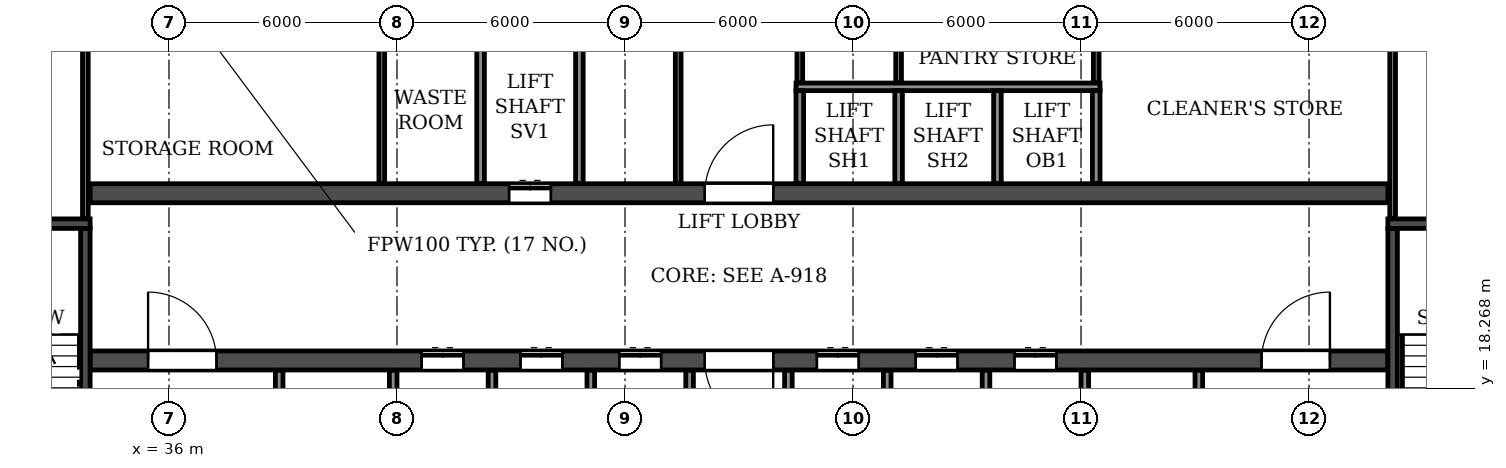
"""IFC4 building model, lengths in metres.
Left out: names, types, materials, properties, quantities, classifications, styles, units other than length and angle.
Written with IfcOpenShell. Run it as: python <this file> out.ifc"""

import sys

from ifc_helpers import new_model, si_unit, direction, frame, frame_2d, origin, place, context, subcontext, project, spatial, rectangle, extrude, element, fill, save


model = new_model("IFC4")
c1 = context("Model", 3, precision=1e-05, world=origin(), true_north=direction((0.0, 1.0)))
c2 = subcontext(c1, "Body", "Model", "MODEL_VIEW")
j1 = project(units=[si_unit("LENGTHUNIT", "METRE"), si_unit("PLANEANGLEUNIT", "RADIAN")], contexts=[c1])
p1 = place(None, origin())
s1 = spatial("IfcSite", under=j1, at=p1, CompositionType="ELEMENT")
p2 = place(p1, origin())
s2 = spatial("IfcBuilding", under=s1, at=p2, CompositionType="ELEMENT")
p3 = place(p2, frame((0.0, 0.0, 102.6)))
s3 = spatial("IfcBuildingStorey", under=s2, at=p3, CompositionType="ELEMENT", Elevation=102.6)
p4 = place(p3, frame((33.925, 19.0, 0.0), z_axis=(0.0, 0.0, 1.0), x_axis=(1.0, 0.0, 0.0)))
e1 = element("IfcWall", 1, at=p4, inside=s3, PredefinedType="SOLIDWALL", context=c2, shape_type="SweptSolid", body=[
    extrude(rectangle(XDim=34.15, YDim=0.5, at=frame_2d((17.075, 0.0))), origin(), (0.0, 0.0, 1.0), 3.0),
])
p5 = place(p4, frame((16.175, 0.0, 0.0)))
e2 = element("IfcOpeningElement", 2, at=p5, cuts=e1, PredefinedType="OPENING", context=c2, shape_type="SweptSolid", body=[
    extrude(rectangle(XDim=1.8, YDim=2.1, at=frame_2d((0.9, 1.05))), frame((0.0, 0.26, 0.0), z_axis=(0.0, -1.0, 0.0), x_axis=(1.0, 0.0, 0.0)), (0.0, 0.0, 1.0), 0.52),
])
p6 = place(p4, frame((1.525, 0.0, 0.0)))
e3 = element("IfcOpeningElement", 3, at=p6, cuts=e1, PredefinedType="OPENING", context=c2, shape_type="SweptSolid", body=[
    extrude(rectangle(XDim=1.8, YDim=2.1, at=frame_2d((0.9, 1.05))), frame((0.0, 0.26, 0.0), z_axis=(0.0, -1.0, 0.0), x_axis=(1.0, 0.0, 0.0)), (0.0, 0.0, 1.0), 0.52),
])
p7 = place(p4, frame((8.725, 0.0, 0.0)))
e4 = element("IfcOpeningElement", 4, at=p7, cuts=e1, PredefinedType="OPENING", context=c2, shape_type="SweptSolid", body=[
    extrude(rectangle(XDim=1.1, YDim=2.1, at=frame_2d((0.55, 1.05))), frame((0.0, 0.26, 0.0), z_axis=(0.0, -1.0, 0.0), x_axis=(1.0, 0.0, 0.0)), (0.0, 0.0, 1.0), 0.52),
])
p8 = place(p4, frame((11.325, 0.0, 0.0)))
e5 = element("IfcOpeningElement", 5, at=p8, cuts=e1, PredefinedType="OPENING", context=c2, shape_type="SweptSolid", body=[
    extrude(rectangle(XDim=1.1, YDim=2.1, at=frame_2d((0.55, 1.05))), frame((0.0, 0.26, 0.0), z_axis=(0.0, -1.0, 0.0), x_axis=(1.0, 0.0, 0.0)), (0.0, 0.0, 1.0), 0.52),
])
p9 = place(p4, frame((13.925, 0.0, 0.0)))
e6 = element("IfcOpeningElement", 6, at=p9, cuts=e1, PredefinedType="OPENING", context=c2, shape_type="SweptSolid", body=[
    extrude(rectangle(XDim=1.1, YDim=2.1, at=frame_2d((0.55, 1.05))), frame((0.0, 0.26, 0.0), z_axis=(0.0, -1.0, 0.0), x_axis=(1.0, 0.0, 0.0)), (0.0, 0.0, 1.0), 0.52),
])
p10 = place(p4, frame((19.125, 0.0, 0.0)))
e7 = element("IfcOpeningElement", 7, at=p10, cuts=e1, PredefinedType="OPENING", context=c2, shape_type="SweptSolid", body=[
    extrude(rectangle(XDim=1.1, YDim=2.1, at=frame_2d((0.55, 1.05))), frame((0.0, 0.26, 0.0), z_axis=(0.0, -1.0, 0.0), x_axis=(1.0, 0.0, 0.0)), (0.0, 0.0, 1.0), 0.52),
])
p11 = place(p4, frame((21.725, 0.0, 0.0)))
e8 = element("IfcOpeningElement", 8, at=p11, cuts=e1, PredefinedType="OPENING", context=c2, shape_type="SweptSolid", body=[
    extrude(rectangle(XDim=1.1, YDim=2.1, at=frame_2d((0.55, 1.05))), frame((0.0, 0.26, 0.0), z_axis=(0.0, -1.0, 0.0), x_axis=(1.0, 0.0, 0.0)), (0.0, 0.0, 1.0), 0.52),
])
p12 = place(p4, frame((24.325, 0.0, 0.0)))
e9 = element("IfcOpeningElement", 9, at=p12, cuts=e1, PredefinedType="OPENING", context=c2, shape_type="SweptSolid", body=[
    extrude(rectangle(XDim=1.1, YDim=2.1, at=frame_2d((0.55, 1.05))), frame((0.0, 0.26, 0.0), z_axis=(0.0, -1.0, 0.0), x_axis=(1.0, 0.0, 0.0)), (0.0, 0.0, 1.0), 0.52),
])
p13 = place(p4, frame((30.825, 0.0, 0.0)))
e10 = element("IfcOpeningElement", 10, at=p13, cuts=e1, PredefinedType="OPENING", context=c2, shape_type="SweptSolid", body=[
    extrude(rectangle(XDim=1.8, YDim=2.1, at=frame_2d((0.9, 1.05))), frame((0.0, 0.26, 0.0), z_axis=(0.0, -1.0, 0.0), x_axis=(1.0, 0.0, 0.0)), (0.0, 0.0, 1.0), 0.52),
])
p14 = place(p3, frame((33.925, 23.4, 0.0), z_axis=(0.0, 0.0, 1.0), x_axis=(1.0, 0.0, 0.0)))
e11 = element("IfcWall", 11, at=p14, inside=s3, PredefinedType="SOLIDWALL", context=c2, shape_type="SweptSolid", body=[
    extrude(rectangle(XDim=34.15, YDim=0.5, at=frame_2d((17.075, 0.0))), origin(), (0.0, 0.0, 1.0), 3.0),
])
p15 = place(p14, frame((16.175, 0.0, 0.0)))
e12 = element("IfcOpeningElement", 12, at=p15, cuts=e11, PredefinedType="OPENING", context=c2, shape_type="SweptSolid", body=[
    extrude(rectangle(XDim=1.8, YDim=2.1, at=frame_2d((0.9, 1.05))), frame((0.0, 0.26, 0.0), z_axis=(0.0, -1.0, 0.0), x_axis=(1.0, 0.0, 0.0)), (0.0, 0.0, 1.0), 0.52),
])
p16 = place(p14, frame((11.025, 0.0, 0.0)))
e13 = element("IfcOpeningElement", 13, at=p16, cuts=e11, PredefinedType="OPENING", context=c2, shape_type="SweptSolid", body=[
    extrude(rectangle(XDim=1.1, YDim=2.1, at=frame_2d((0.55, 1.05))), frame((0.0, 0.26, 0.0), z_axis=(0.0, -1.0, 0.0), x_axis=(1.0, 0.0, 0.0)), (0.0, 0.0, 1.0), 0.52),
])
p17 = place(p3, frame((33.8, 14.85, 0.0), z_axis=(0.0, 0.0, 1.0), x_axis=(0.0, 1.0, 0.0)))
e14 = element("IfcWall", 14, at=p17, inside=s3, PredefinedType="SOLIDWALL", context=c2, shape_type="SweptSolid", body=[
    extrude(rectangle(XDim=7.625, YDim=0.25, at=frame_2d((3.812, 0.0))), origin(), (0.0, 0.0, 1.0), 3.0),
])
p18 = place(p17, frame((0.45, 0.0, 0.0)))
e15 = element("IfcOpeningElement", 15, at=p18, cuts=e14, PredefinedType="OPENING", context=c2, shape_type="SweptSolid", body=[
    extrude(rectangle(XDim=1.0, YDim=2.1, at=frame_2d((0.5, 1.05))), frame((0.0, 0.135, 0.0), z_axis=(0.0, -1.0, 0.0), x_axis=(1.0, 0.0, 0.0)), (0.0, 0.0, 1.0), 0.27),
])
p19 = place(p3, frame((29.875, 22.6, 0.0), z_axis=(0.0, 0.0, 1.0), x_axis=(1.0, 0.0, 0.0)))
e16 = element("IfcWall", 16, at=p19, inside=s3, PredefinedType="SOLIDWALL", context=c2, shape_type="SweptSolid", body=[
    extrude(rectangle(XDim=4.05, YDim=0.25, at=frame_2d((2.025, 0.0))), origin(), (0.0, 0.0, 1.0), 3.0),
])
p20 = place(p3, frame((68.2, 14.85, 0.0), z_axis=(0.0, 0.0, 1.0), x_axis=(0.0, 1.0, 0.0)))
e17 = element("IfcWall", 17, at=p20, inside=s3, PredefinedType="SOLIDWALL", context=c2, shape_type="SweptSolid", body=[
    extrude(rectangle(XDim=7.625, YDim=0.25, at=frame_2d((3.812, 0.0))), origin(), (0.0, 0.0, 1.0), 3.0),
])
p21 = place(p20, frame((0.45, 0.0, 0.0)))
e18 = element("IfcOpeningElement", 18, at=p21, cuts=e17, PredefinedType="OPENING", context=c2, shape_type="SweptSolid", body=[
    extrude(rectangle(XDim=1.0, YDim=2.1, at=frame_2d((0.5, 1.05))), frame((0.0, 0.135, 0.0), z_axis=(0.0, -1.0, 0.0), x_axis=(1.0, 0.0, 0.0)), (0.0, 0.0, 1.0), 0.27),
])
p22 = place(p3, frame((68.075, 22.6, 0.0), z_axis=(0.0, 0.0, 1.0), x_axis=(1.0, 0.0, 0.0)))
e19 = element("IfcWall", 19, at=p22, inside=s3, PredefinedType="SOLIDWALL", context=c2, shape_type="SweptSolid", body=[
    extrude(rectangle(XDim=4.05, YDim=0.25, at=frame_2d((2.025, 0.0))), origin(), (0.0, 0.0, 1.0), 3.0),
])
p23 = place(p3, frame((49.4, 23.66, 0.0), z_axis=(0.0, 0.0, 1.0), x_axis=(0.0, 1.0, 0.0)))
e20 = element("IfcWall", 20, at=p23, inside=s3, PredefinedType="PARTITIONING", context=c2, shape_type="SweptSolid", body=[
    extrude(rectangle(XDim=3.88, YDim=0.15, at=frame_2d((1.94, 0.0))), origin(), (0.0, 0.0, 1.0), 3.0),
])
p24 = place(p3, frame((52.6, 26.3, 0.0), z_axis=(0.0, 0.0, 1.0), x_axis=(0.0, 1.0, 0.0)))
e21 = element("IfcWall", 21, at=p24, inside=s3, PredefinedType="PARTITIONING", context=c2, shape_type="SweptSolid", body=[
    extrude(rectangle(XDim=1.24, YDim=0.15, at=frame_2d((0.62, 0.0))), origin(), (0.0, 0.0, 1.0), 3.0),
])
p25 = place(p3, frame((41.6, 23.66, 0.0), z_axis=(0.0, 0.0, 1.0), x_axis=(0.0, 1.0, 0.0)))
e22 = element("IfcWall", 22, at=p25, inside=s3, PredefinedType="PARTITIONING", context=c2, shape_type="SweptSolid", body=[
    extrude(rectangle(XDim=3.88, YDim=0.15, at=frame_2d((1.94, 0.0))), origin(), (0.0, 0.0, 1.0), 3.0),
])
for number, where, z_axis, x_axis in (
    (23, (55.2, 26.3, 0.0), (0.0, 0.0, 1.0), (0.0, 1.0, 0.0)),
    (24, (60.4, 26.3, 0.0), (0.0, 0.0, 1.0), (0.0, 1.0, 0.0)),
):
    element("IfcWall", number, at=place(p3, frame(where, z_axis=z_axis, x_axis=x_axis)), inside=s3, PredefinedType="PARTITIONING", context=c2, shape_type="SweptSolid", body=[
        extrude(rectangle(XDim=1.24, YDim=0.15, at=frame_2d((0.62, 0.0))), origin(), (0.0, 0.0, 1.0), 3.0),
    ])
for number, where, z_axis, x_axis in (
    (25, (33.8, 22.735, 0.0), (0.0, 0.0, 1.0), (0.0, 1.0, 0.0)),
    (26, (68.2, 22.735, 0.0), (0.0, 0.0, 1.0), (0.0, 1.0, 0.0)),
):
    element("IfcWall", number, at=place(p3, frame(where, z_axis=z_axis, x_axis=x_axis)), inside=s3, PredefinedType="PARTITIONING", context=c2, shape_type="SweptSolid", body=[
        extrude(rectangle(XDim=4.805, YDim=0.15, at=frame_2d((2.402, 0.0))), origin(), (0.0, 0.0, 1.0), 3.0),
    ])
p26 = place(p3, frame((52.5, 26.2, 0.0), z_axis=(0.0, 0.0, 1.0), x_axis=(1.0, 0.0, 0.0)))
e27 = element("IfcWall", 27, at=p26, inside=s3, PredefinedType="PARTITIONING", context=c2, shape_type="SweptSolid", body=[
    extrude(rectangle(XDim=8.0, YDim=0.2, at=frame_2d((4.0, 0.0))), origin(), (0.0, 0.0, 1.0), 3.0),
])
p27 = place(p3, frame((38.9, 14.86, 0.0), z_axis=(0.0, 0.0, 1.0), x_axis=(0.0, 1.0, 0.0)))
e28 = element("IfcWall", 28, at=p27, inside=s3, PredefinedType="PARTITIONING", context=c2, shape_type="SweptSolid", body=[
    extrude(rectangle(XDim=3.88, YDim=0.2, at=frame_2d((1.94, 0.0))), origin(), (0.0, 0.0, 1.0), 3.0),
])
p28 = place(p27, frame((1.39, 0.0, 0.0)))
e29 = element("IfcOpeningElement", 29, at=p28, cuts=e28, PredefinedType="OPENING", context=c2, shape_type="SweptSolid", body=[
    extrude(rectangle(XDim=1.1, YDim=2.1, at=frame_2d((0.55, 1.05))), frame((0.0, 0.11, 0.0), z_axis=(0.0, -1.0, 0.0), x_axis=(1.0, 0.0, 0.0)), (0.0, 0.0, 1.0), 0.22),
])
p29 = place(p3, frame((41.9, 14.86, 0.0), z_axis=(0.0, 0.0, 1.0), x_axis=(0.0, 1.0, 0.0)))
e30 = element("IfcWall", 30, at=p29, inside=s3, PredefinedType="PARTITIONING", context=c2, shape_type="SweptSolid", body=[
    extrude(rectangle(XDim=3.88, YDim=0.2, at=frame_2d((1.94, 0.0))), origin(), (0.0, 0.0, 1.0), 3.0),
])
p30 = place(p3, frame((44.2, 23.66, 0.0), z_axis=(0.0, 0.0, 1.0), x_axis=(0.0, 1.0, 0.0)))
e31 = element("IfcWall", 31, at=p30, inside=s3, PredefinedType="PARTITIONING", context=c2, shape_type="SweptSolid", body=[
    extrude(rectangle(XDim=3.88, YDim=0.2, at=frame_2d((1.94, 0.0))), origin(), (0.0, 0.0, 1.0), 3.0),
])
p31 = place(p3, frame((44.5, 16.3, 0.0), z_axis=(0.0, 0.0, 1.0), x_axis=(0.0, 1.0, 0.0)))
e32 = element("IfcWall", 32, at=p31, inside=s3, PredefinedType="PARTITIONING", context=c2, shape_type="SweptSolid", body=[
    extrude(rectangle(XDim=2.44, YDim=0.2, at=frame_2d((1.22, 0.0))), origin(), (0.0, 0.0, 1.0), 3.0),
])
p32 = place(p3, frame((46.8, 23.66, 0.0), z_axis=(0.0, 0.0, 1.0), x_axis=(0.0, 1.0, 0.0)))
e33 = element("IfcWall", 33, at=p32, inside=s3, PredefinedType="PARTITIONING", context=c2, shape_type="SweptSolid", body=[
    extrude(rectangle(XDim=3.88, YDim=0.2, at=frame_2d((1.94, 0.0))), origin(), (0.0, 0.0, 1.0), 3.0),
])
for number, where, z_axis, x_axis in (
    (34, (47.1, 16.3, 0.0), (0.0, 0.0, 1.0), (0.0, 1.0, 0.0)),
    (35, (49.7, 16.3, 0.0), (0.0, 0.0, 1.0), (0.0, 1.0, 0.0)),
    (36, (52.3, 16.3, 0.0), (0.0, 0.0, 1.0), (0.0, 1.0, 0.0)),
):
    element("IfcWall", number, at=place(p3, frame(where, z_axis=z_axis, x_axis=x_axis)), inside=s3, PredefinedType="PARTITIONING", context=c2, shape_type="SweptSolid", body=[
        extrude(rectangle(XDim=2.44, YDim=0.2, at=frame_2d((1.22, 0.0))), origin(), (0.0, 0.0, 1.0), 3.0),
    ])
p33 = place(p3, frame((52.6, 23.66, 0.0), z_axis=(0.0, 0.0, 1.0), x_axis=(0.0, 1.0, 0.0)))
e37 = element("IfcWall", 37, at=p33, inside=s3, PredefinedType="PARTITIONING", context=c2, shape_type="SweptSolid", body=[
    extrude(rectangle(XDim=2.44, YDim=0.2, at=frame_2d((1.22, 0.0))), origin(), (0.0, 0.0, 1.0), 3.0),
])
p34 = place(p3, frame((54.9, 16.3, 0.0), z_axis=(0.0, 0.0, 1.0), x_axis=(0.0, 1.0, 0.0)))
e38 = element("IfcWall", 38, at=p34, inside=s3, PredefinedType="PARTITIONING", context=c2, shape_type="SweptSolid", body=[
    extrude(rectangle(XDim=2.44, YDim=0.2, at=frame_2d((1.22, 0.0))), origin(), (0.0, 0.0, 1.0), 3.0),
])
p35 = place(p3, frame((55.2, 23.66, 0.0), z_axis=(0.0, 0.0, 1.0), x_axis=(0.0, 1.0, 0.0)))
e39 = element("IfcWall", 39, at=p35, inside=s3, PredefinedType="PARTITIONING", context=c2, shape_type="SweptSolid", body=[
    extrude(rectangle(XDim=2.44, YDim=0.2, at=frame_2d((1.22, 0.0))), origin(), (0.0, 0.0, 1.0), 3.0),
])
p36 = place(p3, frame((57.5, 16.3, 0.0), z_axis=(0.0, 0.0, 1.0), x_axis=(0.0, 1.0, 0.0)))
e40 = element("IfcWall", 40, at=p36, inside=s3, PredefinedType="PARTITIONING", context=c2, shape_type="SweptSolid", body=[
    extrude(rectangle(XDim=2.44, YDim=0.2, at=frame_2d((1.22, 0.0))), origin(), (0.0, 0.0, 1.0), 3.0),
])
p37 = place(p3, frame((57.8, 23.66, 0.0), z_axis=(0.0, 0.0, 1.0), x_axis=(0.0, 1.0, 0.0)))
e41 = element("IfcWall", 41, at=p37, inside=s3, PredefinedType="PARTITIONING", context=c2, shape_type="SweptSolid", body=[
    extrude(rectangle(XDim=2.44, YDim=0.2, at=frame_2d((1.22, 0.0))), origin(), (0.0, 0.0, 1.0), 3.0),
])
p38 = place(p3, frame((60.1, 14.86, 0.0), z_axis=(0.0, 0.0, 1.0), x_axis=(0.0, 1.0, 0.0)))
e42 = element("IfcWall", 42, at=p38, inside=s3, PredefinedType="PARTITIONING", context=c2, shape_type="SweptSolid", body=[
    extrude(rectangle(XDim=3.88, YDim=0.2, at=frame_2d((1.94, 0.0))), origin(), (0.0, 0.0, 1.0), 3.0),
])
p39 = place(p3, frame((60.4, 23.66, 0.0), z_axis=(0.0, 0.0, 1.0), x_axis=(0.0, 1.0, 0.0)))
e43 = element("IfcWall", 43, at=p39, inside=s3, PredefinedType="PARTITIONING", context=c2, shape_type="SweptSolid", body=[
    extrude(rectangle(XDim=2.44, YDim=0.2, at=frame_2d((1.22, 0.0))), origin(), (0.0, 0.0, 1.0), 3.0),
])
p40 = place(p3, frame((63.1, 14.86, 0.0), z_axis=(0.0, 0.0, 1.0), x_axis=(0.0, 1.0, 0.0)))
e44 = element("IfcWall", 44, at=p40, inside=s3, PredefinedType="PARTITIONING", context=c2, shape_type="SweptSolid", body=[
    extrude(rectangle(XDim=3.88, YDim=0.2, at=frame_2d((1.94, 0.0))), origin(), (0.0, 0.0, 1.0), 3.0),
])
p41 = place(p40, frame((1.39, 0.0, 0.0)))
e45 = element("IfcOpeningElement", 45, at=p41, cuts=e44, PredefinedType="OPENING", context=c2, shape_type="SweptSolid", body=[
    extrude(rectangle(XDim=1.1, YDim=2.1, at=frame_2d((0.55, 1.05))), frame((0.0, 0.11, 0.0), z_axis=(0.0, -1.0, 0.0), x_axis=(1.0, 0.0, 0.0)), (0.0, 0.0, 1.0), 0.22),
])
p42 = place(p15, origin())
e46 = element("IfcDoor", 46, at=p42, inside=s3, OperationType="DOUBLE_DOOR_SINGLE_SWING", PredefinedType="DOOR", context=c2, shape_type="SweptSolid", body=[
    extrude(rectangle(XDim=1.8, YDim=2.1, at=frame_2d((0.9, 1.05))), frame((0.0, 0.025, 0.0), z_axis=(0.0, -1.0, 0.0), x_axis=(1.0, 0.0, 0.0)), (0.0, 0.0, 1.0), 0.05),
])
fill(e12, e46)
p43 = place(p5, frame((1.8, 0.0, 0.0), z_axis=(0.0, 0.0, 1.0), x_axis=(-1.0, 0.0, 0.0)))
e47 = element("IfcDoor", 47, at=p43, inside=s3, OperationType="DOUBLE_DOOR_SINGLE_SWING", PredefinedType="DOOR", context=c2, shape_type="SweptSolid", body=[
    extrude(rectangle(XDim=1.8, YDim=2.1, at=frame_2d((0.9, 1.05))), frame((0.0, 0.025, 0.0), z_axis=(0.0, -1.0, 0.0), x_axis=(1.0, 0.0, 0.0)), (0.0, 0.0, 1.0), 0.05),
])
fill(e2, e47)
p44 = place(p6, origin())
e48 = element("IfcDoor", 48, at=p44, inside=s3, OperationType="DOUBLE_DOOR_SINGLE_SWING", PredefinedType="DOOR", context=c2, shape_type="SweptSolid", body=[
    extrude(rectangle(XDim=1.8, YDim=2.1, at=frame_2d((0.9, 1.05))), frame((0.0, 0.025, 0.0), z_axis=(0.0, -1.0, 0.0), x_axis=(1.0, 0.0, 0.0)), (0.0, 0.0, 1.0), 0.05),
])
fill(e3, e48)
p45 = place(p7, origin())
e49 = element("IfcDoor", 49, at=p45, inside=s3, OperationType="DOUBLE_DOOR_SLIDING", PredefinedType="DOOR", context=c2, shape_type="SweptSolid", body=[
    extrude(rectangle(XDim=1.1, YDim=2.1, at=frame_2d((0.55, 1.05))), frame((0.0, 0.025, 0.0), z_axis=(0.0, -1.0, 0.0), x_axis=(1.0, 0.0, 0.0)), (0.0, 0.0, 1.0), 0.05),
])
fill(e4, e49)
p46 = place(p16, origin())
e50 = element("IfcDoor", 50, at=p46, inside=s3, OperationType="DOUBLE_DOOR_SLIDING", PredefinedType="DOOR", context=c2, shape_type="SweptSolid", body=[
    extrude(rectangle(XDim=1.1, YDim=2.1, at=frame_2d((0.55, 1.05))), frame((0.0, 0.025, 0.0), z_axis=(0.0, -1.0, 0.0), x_axis=(1.0, 0.0, 0.0)), (0.0, 0.0, 1.0), 0.05),
])
fill(e13, e50)
p47 = place(p8, origin())
e51 = element("IfcDoor", 51, at=p47, inside=s3, OperationType="DOUBLE_DOOR_SLIDING", PredefinedType="DOOR", context=c2, shape_type="SweptSolid", body=[
    extrude(rectangle(XDim=1.1, YDim=2.1, at=frame_2d((0.55, 1.05))), frame((0.0, 0.025, 0.0), z_axis=(0.0, -1.0, 0.0), x_axis=(1.0, 0.0, 0.0)), (0.0, 0.0, 1.0), 0.05),
])
fill(e5, e51)
p48 = place(p9, origin())
e52 = element("IfcDoor", 52, at=p48, inside=s3, OperationType="DOUBLE_DOOR_SLIDING", PredefinedType="DOOR", context=c2, shape_type="SweptSolid", body=[
    extrude(rectangle(XDim=1.1, YDim=2.1, at=frame_2d((0.55, 1.05))), frame((0.0, 0.025, 0.0), z_axis=(0.0, -1.0, 0.0), x_axis=(1.0, 0.0, 0.0)), (0.0, 0.0, 1.0), 0.05),
])
fill(e6, e52)
p49 = place(p10, origin())
e53 = element("IfcDoor", 53, at=p49, inside=s3, OperationType="DOUBLE_DOOR_SLIDING", PredefinedType="DOOR", context=c2, shape_type="SweptSolid", body=[
    extrude(rectangle(XDim=1.1, YDim=2.1, at=frame_2d((0.55, 1.05))), frame((0.0, 0.025, 0.0), z_axis=(0.0, -1.0, 0.0), x_axis=(1.0, 0.0, 0.0)), (0.0, 0.0, 1.0), 0.05),
])
fill(e7, e53)
p50 = place(p11, origin())
e54 = element("IfcDoor", 54, at=p50, inside=s3, OperationType="DOUBLE_DOOR_SLIDING", PredefinedType="DOOR", context=c2, shape_type="SweptSolid", body=[
    extrude(rectangle(XDim=1.1, YDim=2.1, at=frame_2d((0.55, 1.05))), frame((0.0, 0.025, 0.0), z_axis=(0.0, -1.0, 0.0), x_axis=(1.0, 0.0, 0.0)), (0.0, 0.0, 1.0), 0.05),
])
fill(e8, e54)
p51 = place(p12, origin())
e55 = element("IfcDoor", 55, at=p51, inside=s3, OperationType="DOUBLE_DOOR_SLIDING", PredefinedType="DOOR", context=c2, shape_type="SweptSolid", body=[
    extrude(rectangle(XDim=1.1, YDim=2.1, at=frame_2d((0.55, 1.05))), frame((0.0, 0.025, 0.0), z_axis=(0.0, -1.0, 0.0), x_axis=(1.0, 0.0, 0.0)), (0.0, 0.0, 1.0), 0.05),
])
fill(e9, e55)
p52 = place(p13, origin())
e56 = element("IfcDoor", 56, at=p52, inside=s3, OperationType="DOUBLE_DOOR_SINGLE_SWING", PredefinedType="DOOR", context=c2, shape_type="SweptSolid", body=[
    extrude(rectangle(XDim=1.8, YDim=2.1, at=frame_2d((0.9, 1.05))), frame((0.0, 0.025, 0.0), z_axis=(0.0, -1.0, 0.0), x_axis=(1.0, 0.0, 0.0)), (0.0, 0.0, 1.0), 0.05),
])
fill(e10, e56)
save(model, sys.argv[1])
